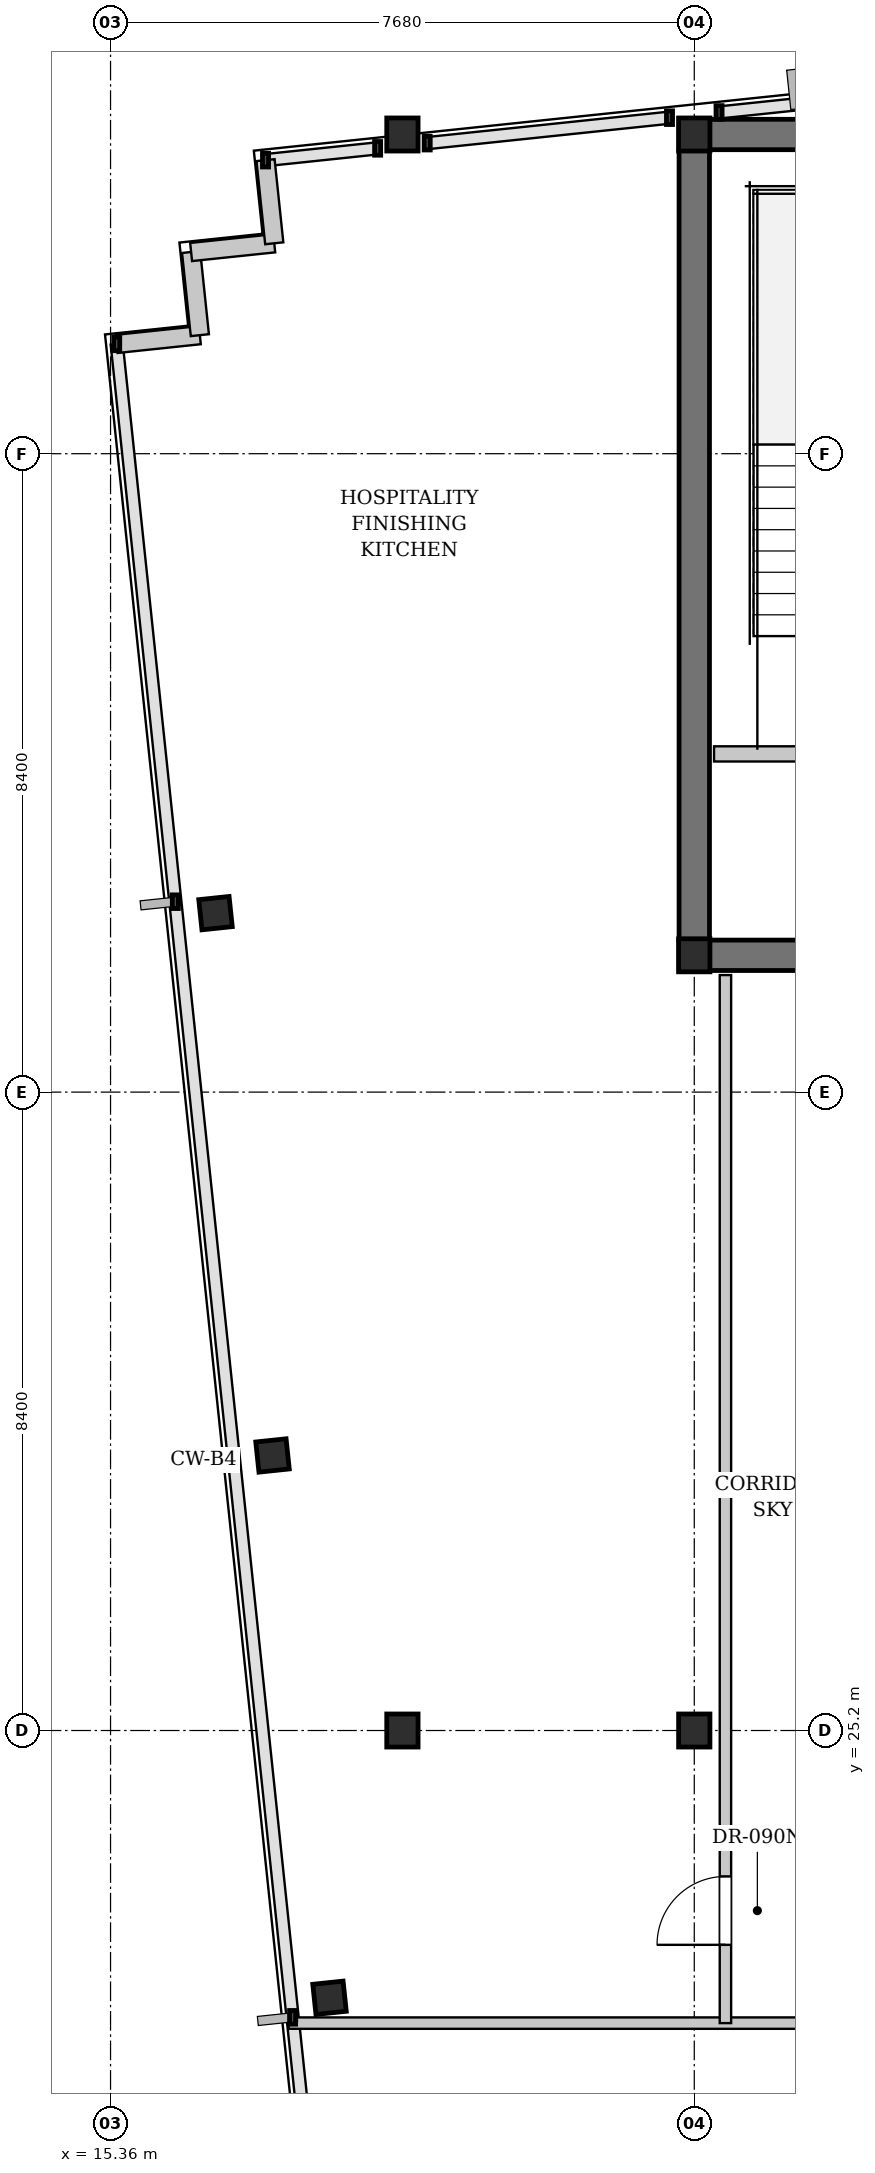
"""IFC4 building model, lengths in metres.
Left out: names, types, materials, properties, quantities, classifications, styles, units other than length and angle.
Written with IfcOpenShell. Run it as: python <this file> out.ifc"""

import sys

from ifc_helpers import new_model, si_unit, direction, frame, frame_2d, origin, origin_2d, place, context, subcontext, project, spatial, rectangle, i_section, extrude, element, fill, save


model = new_model("IFC4")
c1 = context("Model", 3, precision=1e-05, world=origin(), true_north=direction((0.0, 1.0)))
c2 = subcontext(c1, "Body", "Model", "MODEL_VIEW")
j1 = project(units=[si_unit("LENGTHUNIT", "METRE"), si_unit("PLANEANGLEUNIT", "RADIAN")], contexts=[c1])
p1 = place(None, origin())
s1 = spatial("IfcSite", under=j1, at=p1, CompositionType="ELEMENT")
p2 = place(p1, origin())
s2 = spatial("IfcBuilding", under=s1, at=p2, CompositionType="ELEMENT")
p3 = place(p2, frame((0.0, 0.0, 227.6)))
s3 = spatial("IfcBuildingStorey", under=s2, at=p3, CompositionType="ELEMENT", Elevation=227.6)
p4 = place(p3, frame((22.84, 46.2, 0.0), z_axis=(0.0, 0.0, 1.0), x_axis=(1.0, 0.0, 0.0)))
e1 = element("IfcWall", 1, at=p4, inside=s3, PredefinedType="SHEAR", context=c2, shape_type="SweptSolid", body=[
    extrude(rectangle(XDim=31.12, YDim=0.4, at=frame_2d((15.56, 0.0))), origin(), (0.0, 0.0, 1.0), 3.08),
])
p5 = place(p3, frame((22.84, 35.4, 0.0), z_axis=(0.0, 0.0, 1.0), x_axis=(1.0, 0.0, 0.0)))
e2 = element("IfcWall", 2, at=p5, inside=s3, PredefinedType="SHEAR", context=c2, shape_type="SweptSolid", body=[
    extrude(rectangle(XDim=5.36, YDim=0.4, at=frame_2d((2.68, 0.0))), origin(), (0.0, 0.0, 1.0), 3.08),
])
p6 = place(p3, frame((23.04, 35.6, 0.0), z_axis=(0.0, 0.0, 1.0), x_axis=(0.0, 1.0, 0.0)))
e3 = element("IfcWall", 3, at=p6, inside=s3, PredefinedType="SHEAR", context=c2, shape_type="SweptSolid", body=[
    extrude(rectangle(XDim=10.4, YDim=0.4, at=frame_2d((5.2, 0.0))), origin(), (0.0, 0.0, 1.0), 3.08),
])
for number, where, z_axis, x_axis in (
    (4, (23.04, 35.4, 0.0), (0.0, 0.0, 1.0), (1.0, 0.0, 0.0)),
    (5, (23.04, 46.2, 0.0), (0.0, 0.0, 1.0), (1.0, 0.0, 0.0)),
    (6, (23.04, 25.2, 0.0), (0.0, 0.0, 1.0), (1.0, 0.0, 0.0)),
    (7, (19.2, 25.2, 0.0), (0.0, 0.0, 1.0), (1.0, 0.0, 0.0)),
    (8, (19.2, 46.2, 0.0), (0.0, 0.0, 1.0), (1.0, 0.0, 0.0)),
):
    element("IfcColumn", number, at=place(p3, frame(where, z_axis=z_axis, x_axis=x_axis)), inside=s3, PredefinedType="COLUMN", context=c2, shape_type="SweptSolid", body=[
        extrude(i_section(OverallWidth=0.412, OverallDepth=0.435, WebThickness=0.036, FlangeThickness=0.058, FilletRadius=0.015, at=origin_2d()), origin(), (0.0, 0.0, 1.0), 3.3),
    ])
for number, where, z_axis, x_axis in (
    (9, (18.241, 21.683, 0.0), (0.0, 0.0, 1.0), (0.995, 0.105, 0.0)),
    (10, (17.491, 28.819, 0.0), (0.0, 0.0, 1.0), (0.995, 0.105, 0.0)),
    (11, (16.741, 35.955, 0.0), (0.0, 0.0, 1.0), (0.995, 0.105, 0.0)),
):
    element("IfcColumn", number, at=place(p3, frame(where, z_axis=z_axis, x_axis=x_axis)), inside=s3, PredefinedType="COLUMN", context=c2, shape_type="SweptSolid", body=[
        extrude(i_section(OverallWidth=0.401, OverallDepth=0.399, WebThickness=0.025, FlangeThickness=0.04, FilletRadius=0.015, at=origin_2d()), origin(), (0.0, 0.0, 1.0), 3.3),
    ])
p7 = place(p3, frame((15.441, 43.445, 0.0), z_axis=(0.0, 0.0, 1.0), x_axis=(0.994495717747, 0.104777227405, 0.0)))
e12 = element("IfcWall", 12, at=p7, inside=s3, PredefinedType="SOLIDWALL", context=c2, shape_type="SweptSolid", body=[
    extrude(rectangle(XDim=1.1, YDim=0.24, at=frame_2d((0.55, 0.0))), origin(), (0.0, 0.0, 1.0), 3.08),
])
p8 = place(p3, frame((16.535, 43.56, 0.0), z_axis=(0.0, 0.0, 1.0), x_axis=(-0.104315068386, 0.994544300928, 0.0)))
e13 = element("IfcWall", 13, at=p8, inside=s3, PredefinedType="SOLIDWALL", context=c2, shape_type="SweptSolid", body=[
    extrude(rectangle(XDim=1.1, YDim=0.24, at=frame_2d((0.55, 0.0))), origin(), (0.0, 0.0, 1.0), 3.08),
])
p9 = place(p3, frame((16.42, 44.654, 0.0), z_axis=(0.0, 0.0, 1.0), x_axis=(0.994541884982, 0.104338099541, 0.0)))
e14 = element("IfcWall", 14, at=p9, inside=s3, PredefinedType="SOLIDWALL", context=c2, shape_type="SweptSolid", body=[
    extrude(rectangle(XDim=1.1, YDim=0.24, at=frame_2d((0.55, 0.0))), origin(), (0.0, 0.0, 1.0), 3.08),
])
p10 = place(p3, frame((17.514, 44.769, 0.0), z_axis=(0.0, 0.0, 1.0), x_axis=(-0.104534592565, 0.994521251134, 0.0)))
e15 = element("IfcWall", 15, at=p10, inside=s3, PredefinedType="SOLIDWALL", context=c2, shape_type="SweptSolid", body=[
    extrude(rectangle(XDim=1.1, YDim=0.24, at=frame_2d((0.55, 0.0))), origin(), (0.0, 0.0, 1.0), 3.08),
])
p11 = place(p3, frame((23.3, 38.05, 0.0), z_axis=(0.0, 0.0, 1.0), x_axis=(1.0, 0.0, 0.0)))
e16 = element("IfcWall", 16, at=p11, inside=s3, PredefinedType="PARTITIONING", context=c2, shape_type="SweptSolid", body=[
    extrude(rectangle(XDim=3.62, YDim=0.2, at=frame_2d((1.81, 0.0))), origin(), (0.0, 0.0, 1.0), 3.08),
])
p12 = place(p11, frame((1.26, 0.0, 0.0)))
e17 = element("IfcOpeningElement", 17, at=p12, cuts=e16, PredefinedType="OPENING", context=c2, shape_type="SweptSolid", body=[
    extrude(rectangle(XDim=1.1, YDim=2.15, at=frame_2d((0.55, 1.075))), frame((0.0, 0.11, 0.0), z_axis=(0.0, -1.0, 0.0), x_axis=(1.0, 0.0, 0.0)), (0.0, 0.0, 1.0), 0.22),
])
p13 = place(p3, frame((17.703, 21.35, 0.0), z_axis=(0.0, 0.0, 1.0), x_axis=(1.0, 0.0, 0.0)))
e18 = element("IfcWall", 18, at=p13, inside=s3, PredefinedType="PARTITIONING", context=c2, shape_type="SweptSolid", body=[
    extrude(rectangle(XDim=15.797, YDim=0.15, at=frame_2d((7.898, 0.0))), origin(), (0.0, 0.0, 1.0), 3.08),
])
p14 = place(p13, frame((8.047, 0.0, 0.0)))
e19 = element("IfcOpeningElement", 19, at=p14, cuts=e18, PredefinedType="OPENING", context=c2, shape_type="SweptSolid", body=[
    extrude(rectangle(XDim=0.95, YDim=2.15, at=frame_2d((0.475, 1.075))), frame((0.0, 0.085, 0.0), z_axis=(0.0, -1.0, 0.0), x_axis=(1.0, 0.0, 0.0)), (0.0, 0.0, 1.0), 0.17),
])
p15 = place(p13, frame((13.067, 0.0, 0.0)))
e20 = element("IfcOpeningElement", 20, at=p15, cuts=e18, PredefinedType="OPENING", context=c2, shape_type="SweptSolid", body=[
    extrude(rectangle(XDim=0.95, YDim=2.15, at=frame_2d((0.475, 1.075))), frame((0.0, 0.085, 0.0), z_axis=(0.0, -1.0, 0.0), x_axis=(1.0, 0.0, 0.0)), (0.0, 0.0, 1.0), 0.17),
])
p16 = place(p3, frame((23.45, 21.35, 0.0), z_axis=(0.0, 0.0, 1.0), x_axis=(0.0, 1.0, 0.0)))
e21 = element("IfcWall", 21, at=p16, inside=s3, PredefinedType="PARTITIONING", context=c2, shape_type="SweptSolid", body=[
    extrude(rectangle(XDim=13.79, YDim=0.15, at=frame_2d((6.895, 0.0))), origin(), (0.0, 0.0, 1.0), 3.08),
])
p17 = place(p16, frame((1.03, 0.0, 0.0)))
e22 = element("IfcOpeningElement", 22, at=p17, cuts=e21, PredefinedType="OPENING", context=c2, shape_type="SweptSolid", body=[
    extrude(rectangle(XDim=0.9, YDim=2.15, at=frame_2d((0.45, 1.075))), frame((0.0, 0.085, 0.0), z_axis=(0.0, -1.0, 0.0), x_axis=(1.0, 0.0, 0.0)), (0.0, 0.0, 1.0), 0.17),
])
p18 = place(p17, origin())
e23 = element("IfcDoor", 23, at=p18, inside=s3, OperationType="SINGLE_SWING_LEFT", PredefinedType="DOOR", context=c2, shape_type="SweptSolid", body=[
    extrude(rectangle(XDim=0.9, YDim=2.15, at=frame_2d((0.45, 1.075))), frame((0.0, 0.025, 0.0), z_axis=(0.0, -1.0, 0.0), x_axis=(1.0, 0.0, 0.0)), (0.0, 0.0, 1.0), 0.05),
])
fill(e22, e23)
save(model, sys.argv[1])
